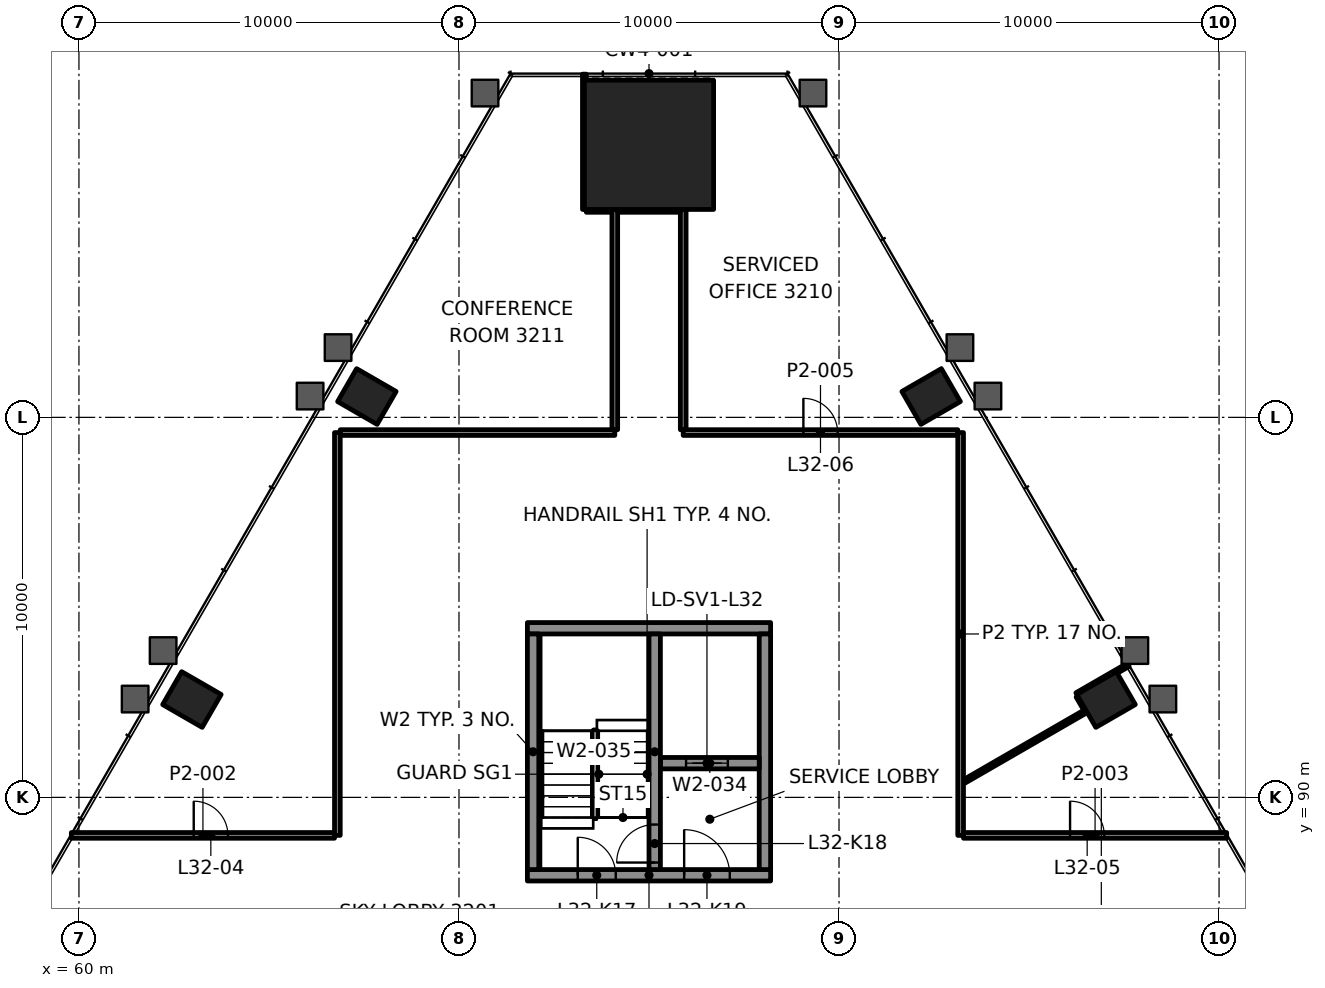
"""IFC4 building model, lengths in metres.
Left out: names, types, materials, properties, quantities, classifications, styles, units other than length and angle.
Written with IfcOpenShell. Run it as: python <this file> out.ifc"""

import sys

from ifc_helpers import new_model, si_unit, direction, frame, frame_2d, origin, origin_2d, place, context, subcontext, project, spatial, rectangle, extrude, element, fill, save


model = new_model("IFC4")
c1 = context("Model", 3, precision=1e-05, world=origin(), true_north=direction((0.0, 1.0)))
c2 = subcontext(c1, "Body", "Model", "MODEL_VIEW")
j1 = project(units=[si_unit("LENGTHUNIT", "METRE"), si_unit("PLANEANGLEUNIT", "RADIAN")], contexts=[c1])
p1 = place(None, origin())
s1 = spatial("IfcSite", under=j1, at=p1, CompositionType="ELEMENT")
p2 = place(p1, origin())
s2 = spatial("IfcBuilding", under=s1, at=p2, CompositionType="ELEMENT")
p3 = place(p2, frame((0.0, 0.0, 140.8)))
s3 = spatial("IfcBuildingStorey", under=s2, at=p3, CompositionType="ELEMENT", Elevation=140.8)
p4 = place(p3, frame((75.0, 107.172, 0.0), z_axis=(0.0, 0.0, 1.0), x_axis=(-1.0, 0.0, 0.0)))
e1 = element("IfcColumn", 1, at=p4, inside=s3, PredefinedType="COLUMN", context=c2, shape_type="SweptSolid", body=[
    extrude(rectangle(XDim=3.4, YDim=3.4, at=origin_2d()), origin(), (0.0, 0.0, 1.0), 6.0),
])
for number, where, z_axis, x_axis in (
    (2, (87.027, 92.575, -0.0), (0.0, 0.0, 1.0), (-0.5, 0.866, 0.0)),
    (3, (82.424, 100.548, -0.0), (0.0, 0.0, 1.0), (-0.5, 0.866, 0.0)),
    (4, (67.576, 100.548, -0.0), (0.0, 0.0, 1.0), (-0.5, -0.866, 0.0)),
    (5, (62.973, 92.575, -0.0), (0.0, 0.0, 1.0), (-0.5, -0.866, 0.0)),
):
    element("IfcColumn", number, at=place(p3, frame(where, z_axis=z_axis, x_axis=x_axis)), inside=s3, PredefinedType="COLUMN", context=c2, shape_type="SweptSolid", body=[
        extrude(rectangle(XDim=1.0, YDim=1.2, at=origin_2d()), origin(), (0.0, 0.0, 1.0), 6.0),
    ])
p5 = place(p3, frame((71.8, 87.95, 0.0), z_axis=(0.0, 0.0, 1.0), x_axis=(1.0, 0.0, 0.0)))
e6 = element("IfcWall", 6, at=p5, inside=s3, PredefinedType="SHEAR", context=c2, shape_type="SweptSolid", body=[
    extrude(rectangle(XDim=6.4, YDim=0.3, at=frame_2d((3.2, 0.0))), origin(), (0.0, 0.0, 1.0), 5.55),
])
p6 = place(p5, frame((1.325, 0.0, 0.0)))
e7 = element("IfcOpeningElement", 7, at=p6, cuts=e6, PredefinedType="OPENING", context=c2, shape_type="SweptSolid", body=[
    extrude(rectangle(XDim=1.0, YDim=2.1, at=frame_2d((0.5, 1.05))), frame((0.0, 0.16, 0.0), z_axis=(0.0, -1.0, 0.0), x_axis=(1.0, 0.0, 0.0)), (0.0, 0.0, 1.0), 0.32),
])
p7 = place(p5, frame((4.125, 0.0, 0.0)))
e8 = element("IfcOpeningElement", 8, at=p7, cuts=e6, PredefinedType="OPENING", context=c2, shape_type="SweptSolid", body=[
    extrude(rectangle(XDim=1.2, YDim=2.1, at=frame_2d((0.6, 1.05))), frame((0.0, 0.16, 0.0), z_axis=(0.0, -1.0, 0.0), x_axis=(1.0, 0.0, 0.0)), (0.0, 0.0, 1.0), 0.32),
])
p8 = place(p3, frame((71.8, 94.45, 0.0), z_axis=(0.0, 0.0, 1.0), x_axis=(1.0, 0.0, 0.0)))
e9 = element("IfcWall", 9, at=p8, inside=s3, PredefinedType="SHEAR", context=c2, shape_type="SweptSolid", body=[
    extrude(rectangle(XDim=6.4, YDim=0.3, at=frame_2d((3.2, 0.0))), origin(), (0.0, 0.0, 1.0), 5.55),
])
for number, where, z_axis, x_axis in (
    (10, (71.95, 88.1, 0.0), (0.0, 0.0, 1.0), (0.0, 1.0, 0.0)),
    (11, (78.05, 88.1, 0.0), (0.0, 0.0, 1.0), (0.0, 1.0, 0.0)),
):
    element("IfcWall", number, at=place(p3, frame(where, z_axis=z_axis, x_axis=x_axis)), inside=s3, PredefinedType="SHEAR", context=c2, shape_type="SweptSolid", body=[
        extrude(rectangle(XDim=6.2, YDim=0.3, at=frame_2d((3.1, 0.0))), origin(), (0.0, 0.0, 1.0), 5.55),
    ])
p9 = place(p3, frame((75.3, 90.9, 0.0), z_axis=(0.0, 0.0, 1.0), x_axis=(1.0, 0.0, 0.0)))
e12 = element("IfcWall", 12, at=p9, inside=s3, PredefinedType="SHEAR", context=c2, shape_type="SweptSolid", body=[
    extrude(rectangle(XDim=2.6, YDim=0.3, at=frame_2d((1.3, 0.0))), origin(), (0.0, 0.0, 1.0), 5.55),
])
p10 = place(p9, frame((0.675, 0.0, 0.0)))
e13 = element("IfcOpeningElement", 13, at=p10, cuts=e12, PredefinedType="OPENING", context=c2, shape_type="SweptSolid", body=[
    extrude(rectangle(XDim=1.1, YDim=2.1, at=frame_2d((0.55, 1.05))), frame((0.0, 0.16, 0.0), z_axis=(0.0, -1.0, 0.0), x_axis=(1.0, 0.0, 0.0)), (0.0, 0.0, 1.0), 0.32),
])
p11 = place(p3, frame((75.15, 88.1, 0.0), z_axis=(0.0, 0.0, 1.0), x_axis=(0.0, 1.0, 0.0)))
e14 = element("IfcWall", 14, at=p11, inside=s3, PredefinedType="SHEAR", context=c2, shape_type="SweptSolid", body=[
    extrude(rectangle(XDim=6.2, YDim=0.3, at=frame_2d((3.1, 0.0))), origin(), (0.0, 0.0, 1.0), 5.55),
])
p12 = place(p11, frame((0.185, 0.0, 0.0)))
e15 = element("IfcOpeningElement", 15, at=p12, cuts=e14, PredefinedType="OPENING", context=c2, shape_type="SweptSolid", body=[
    extrude(rectangle(XDim=1.0, YDim=2.1, at=frame_2d((0.5, 1.05))), frame((0.0, 0.16, 0.0), z_axis=(0.0, -1.0, 0.0), x_axis=(1.0, 0.0, 0.0)), (0.0, 0.0, 1.0), 0.32),
])
p13 = place(p3, frame((59.8, 89.0, 0.0), z_axis=(0.0, 0.0, 1.0), x_axis=(1.0, 0.0, 0.0)))
e16 = element("IfcWall", 16, at=p13, inside=s3, PredefinedType="PARTITIONING", context=c2, shape_type="SweptSolid", body=[
    extrude(rectangle(XDim=6.925, YDim=0.15, at=frame_2d((3.463, 0.0))), origin(), (0.0, 0.0, 1.0), 4.715),
])
p14 = place(p13, frame((3.22, 0.0, 0.0)))
e17 = element("IfcOpeningElement", 17, at=p14, cuts=e16, PredefinedType="OPENING", context=c2, shape_type="SweptSolid", body=[
    extrude(rectangle(XDim=0.9, YDim=2.1, at=frame_2d((0.45, 1.05))), frame((0.0, 0.085, 0.0), z_axis=(0.0, -1.0, 0.0), x_axis=(1.0, 0.0, 0.0)), (0.0, 0.0, 1.0), 0.17),
])
p15 = place(p3, frame((83.275, 89.0, 0.0), z_axis=(0.0, 0.0, 1.0), x_axis=(1.0, 0.0, 0.0)))
e18 = element("IfcWall", 18, at=p15, inside=s3, PredefinedType="PARTITIONING", context=c2, shape_type="SweptSolid", body=[
    extrude(rectangle(XDim=6.925, YDim=0.15, at=frame_2d((3.463, 0.0))), origin(), (0.0, 0.0, 1.0), 4.715),
])
p16 = place(p15, frame((2.805, 0.0, 0.0)))
e19 = element("IfcOpeningElement", 19, at=p16, cuts=e18, PredefinedType="OPENING", context=c2, shape_type="SweptSolid", body=[
    extrude(rectangle(XDim=0.9, YDim=2.1, at=frame_2d((0.45, 1.05))), frame((0.0, 0.085, 0.0), z_axis=(0.0, -1.0, 0.0), x_axis=(1.0, 0.0, 0.0)), (0.0, 0.0, 1.0), 0.17),
])
p17 = place(p3, frame((66.875, 99.6, 0.0), z_axis=(0.0, 0.0, 1.0), x_axis=(1.0, 0.0, 0.0)))
e20 = element("IfcWall", 20, at=p17, inside=s3, PredefinedType="PARTITIONING", context=c2, shape_type="SweptSolid", body=[
    extrude(rectangle(XDim=7.225, YDim=0.15, at=frame_2d((3.612, 0.0))), origin(), (0.0, 0.0, 1.0), 4.715),
])
p18 = place(p3, frame((75.9, 99.6, 0.0), z_axis=(0.0, 0.0, 1.0), x_axis=(1.0, 0.0, 0.0)))
e21 = element("IfcWall", 21, at=p18, inside=s3, PredefinedType="PARTITIONING", context=c2, shape_type="SweptSolid", body=[
    extrude(rectangle(XDim=7.225, YDim=0.15, at=frame_2d((3.612, 0.0))), origin(), (0.0, 0.0, 1.0), 4.715),
])
p19 = place(p18, frame((3.162, 0.0, 0.0)))
e22 = element("IfcOpeningElement", 22, at=p19, cuts=e21, PredefinedType="OPENING", context=c2, shape_type="SweptSolid", body=[
    extrude(rectangle(XDim=0.9, YDim=2.1, at=frame_2d((0.45, 1.05))), frame((0.0, 0.085, 0.0), z_axis=(0.0, -1.0, 0.0), x_axis=(1.0, 0.0, 0.0)), (0.0, 0.0, 1.0), 0.17),
])
p20 = place(p3, frame((73.351, 105.472, 0.0), z_axis=(0.0, 0.0, 1.0), x_axis=(1.0, 0.0, 0.0)))
e23 = element("IfcWall", 23, at=p20, inside=s3, PredefinedType="PARTITIONING", context=c2, shape_type="SweptSolid", body=[
    extrude(rectangle(XDim=0.674, YDim=0.15, at=frame_2d((0.337, 0.0))), origin(), (0.0, 0.0, 1.0), 4.95),
])
p21 = place(p3, frame((83.301, 90.424, 0.0), z_axis=(0.0, 0.0, 1.0), x_axis=(0.866011008513, 0.500024932513, 0.0)))
e24 = element("IfcWall", 24, at=p21, inside=s3, PredefinedType="PARTITIONING", context=c2, shape_type="SweptSolid", body=[
    extrude(rectangle(XDim=3.703, YDim=0.1, at=frame_2d((1.852, 0.0))), origin(), (0.0, 0.0, 1.0), 4.872),
])
p22 = place(p3, frame((86.258, 92.708, 0.0), z_axis=(0.0, 0.0, 1.0), x_axis=(0.866018739521, 0.500011542666, 0.0)))
e25 = element("IfcWall", 25, at=p22, inside=s3, PredefinedType="PARTITIONING", context=c2, shape_type="SweptSolid", body=[
    extrude(rectangle(XDim=1.56, YDim=0.1, at=frame_2d((0.78, 0.0))), origin(), (0.0, 0.0, 1.0), 4.715),
])
p23 = place(p3, frame((83.2, 89.0, 0.0), z_axis=(0.0, 0.0, 1.0), x_axis=(0.0, 1.0, 0.0)))
e26 = element("IfcWall", 26, at=p23, inside=s3, PredefinedType="PARTITIONING", context=c2, shape_type="SweptSolid", body=[
    extrude(rectangle(XDim=10.6, YDim=0.15, at=frame_2d((5.3, 0.0))), origin(), (0.0, 0.0, 1.0), 4.715),
])
p24 = place(p3, frame((75.9, 99.675, 0.0), z_axis=(0.0, 0.0, 1.0), x_axis=(0.0, 1.0, 0.0)))
e27 = element("IfcWall", 27, at=p24, inside=s3, PredefinedType="PARTITIONING", context=c2, shape_type="SweptSolid", body=[
    extrude(rectangle(XDim=5.796, YDim=0.15, at=frame_2d((2.898, 0.0))), origin(), (0.0, 0.0, 1.0), 4.95),
])
p25 = place(p3, frame((74.1, 99.675, 0.0), z_axis=(0.0, 0.0, 1.0), x_axis=(0.0, 1.0, 0.0)))
e28 = element("IfcWall", 28, at=p25, inside=s3, PredefinedType="PARTITIONING", context=c2, shape_type="SweptSolid", body=[
    extrude(rectangle(XDim=5.796, YDim=0.15, at=frame_2d((2.898, 0.0))), origin(), (0.0, 0.0, 1.0), 4.95),
])
p26 = place(p3, frame((73.3, 105.472, 0.0), z_axis=(0.0, 0.0, 1.0), x_axis=(0.0, 1.0, 0.0)))
e29 = element("IfcWall", 29, at=p26, inside=s3, PredefinedType="PARTITIONING", context=c2, shape_type="SweptSolid", body=[
    extrude(rectangle(XDim=3.559, YDim=0.1, at=frame_2d((1.78, 0.0))), origin(), (0.0, 0.0, 1.0), 4.95),
])
p27 = place(p3, frame((66.8, 89.0, 0.0), z_axis=(0.0, 0.0, 1.0), x_axis=(0.0, 1.0, 0.0)))
e30 = element("IfcWall", 30, at=p27, inside=s3, PredefinedType="PARTITIONING", context=c2, shape_type="SweptSolid", body=[
    extrude(rectangle(XDim=10.599, YDim=0.15, at=frame_2d((5.3, 0.0))), origin(), (0.0, 0.0, 1.0), 4.715),
])
p28 = place(p3, frame((86.477, 92.327, 0.0), z_axis=(0.0, 0.0, 1.0), x_axis=(-0.499849133735, 0.866112488944, 0.0)))
e31 = element("IfcWall", 31, at=p28, inside=s3, PredefinedType="PARTITIONING", context=c2, shape_type="SweptSolid", body=[
    extrude(rectangle(XDim=0.389, YDim=0.1, at=frame_2d((0.195, 0.0))), origin(), (0.0, 0.0, 1.0), 4.872),
])
p29 = place(p3, frame((74.175, 105.472, 0.0), z_axis=(0.0, 0.0, 1.0), x_axis=(1.0, 0.0, 0.0)))
e32 = element("IfcWall", 32, at=p29, inside=s3, PredefinedType="PARTITIONING", context=c2, shape_type="SweptSolid", body=[
    extrude(rectangle(XDim=1.649, YDim=0.15, at=frame_2d((0.825, 0.0))), origin(), (0.0, 0.0, 1.0), 4.947),
])
p30 = place(p14, origin())
e33 = element("IfcDoor", 33, at=p30, inside=s3, OperationType="SINGLE_SWING_RIGHT", PredefinedType="DOOR", context=c2, shape_type="SweptSolid", body=[
    extrude(rectangle(XDim=0.9, YDim=2.1, at=frame_2d((0.45, 1.05))), frame((0.0, 0.025, 0.0), z_axis=(0.0, -1.0, 0.0), x_axis=(1.0, 0.0, 0.0)), (0.0, 0.0, 1.0), 0.05),
])
fill(e17, e33)
p31 = place(p16, origin())
e34 = element("IfcDoor", 34, at=p31, inside=s3, OperationType="SINGLE_SWING_RIGHT", PredefinedType="DOOR", context=c2, shape_type="SweptSolid", body=[
    extrude(rectangle(XDim=0.9, YDim=2.1, at=frame_2d((0.45, 1.05))), frame((0.0, 0.025, 0.0), z_axis=(0.0, -1.0, 0.0), x_axis=(1.0, 0.0, 0.0)), (0.0, 0.0, 1.0), 0.05),
])
fill(e19, e34)
p32 = place(p19, origin())
e35 = element("IfcDoor", 35, at=p32, inside=s3, OperationType="SINGLE_SWING_LEFT", PredefinedType="DOOR", context=c2, shape_type="SweptSolid", body=[
    extrude(rectangle(XDim=0.9, YDim=2.1, at=frame_2d((0.45, 1.05))), frame((0.0, 0.025, 0.0), z_axis=(0.0, -1.0, 0.0), x_axis=(1.0, 0.0, 0.0)), (0.0, 0.0, 1.0), 0.05),
])
fill(e22, e35)
p33 = place(p10, origin())
e36 = element("IfcDoor", 36, at=p33, inside=s3, OperationType="DOUBLE_DOOR_SLIDING", PredefinedType="DOOR", context=c2, shape_type="SweptSolid", body=[
    extrude(rectangle(XDim=1.1, YDim=2.1, at=frame_2d((0.55, 1.05))), frame((0.0, 0.025, 0.0), z_axis=(0.0, -1.0, 0.0), x_axis=(1.0, 0.0, 0.0)), (0.0, 0.0, 1.0), 0.05),
])
fill(e13, e36)
p34 = place(p6, origin())
e37 = element("IfcDoor", 37, at=p34, inside=s3, OperationType="SINGLE_SWING_RIGHT", PredefinedType="DOOR", context=c2, shape_type="SweptSolid", body=[
    extrude(rectangle(XDim=1.0, YDim=2.1, at=frame_2d((0.5, 1.05))), frame((0.0, 0.025, 0.0), z_axis=(0.0, -1.0, 0.0), x_axis=(1.0, 0.0, 0.0)), (0.0, 0.0, 1.0), 0.05),
])
fill(e7, e37)
p35 = place(p12, origin())
e38 = element("IfcDoor", 38, at=p35, inside=s3, OperationType="SINGLE_SWING_LEFT", PredefinedType="DOOR", context=c2, shape_type="SweptSolid", body=[
    extrude(rectangle(XDim=1.0, YDim=2.1, at=frame_2d((0.5, 1.05))), frame((0.0, 0.025, 0.0), z_axis=(0.0, -1.0, 0.0), x_axis=(1.0, 0.0, 0.0)), (0.0, 0.0, 1.0), 0.05),
])
fill(e15, e38)
p36 = place(p7, origin())
e39 = element("IfcDoor", 39, at=p36, inside=s3, OperationType="SINGLE_SWING_RIGHT", PredefinedType="DOOR", context=c2, shape_type="SweptSolid", body=[
    extrude(rectangle(XDim=1.2, YDim=2.1, at=frame_2d((0.6, 1.05))), frame((0.0, 0.025, 0.0), z_axis=(0.0, -1.0, 0.0), x_axis=(1.0, 0.0, 0.0)), (0.0, 0.0, 1.0), 0.05),
])
fill(e8, e39)
save(model, sys.argv[1])
